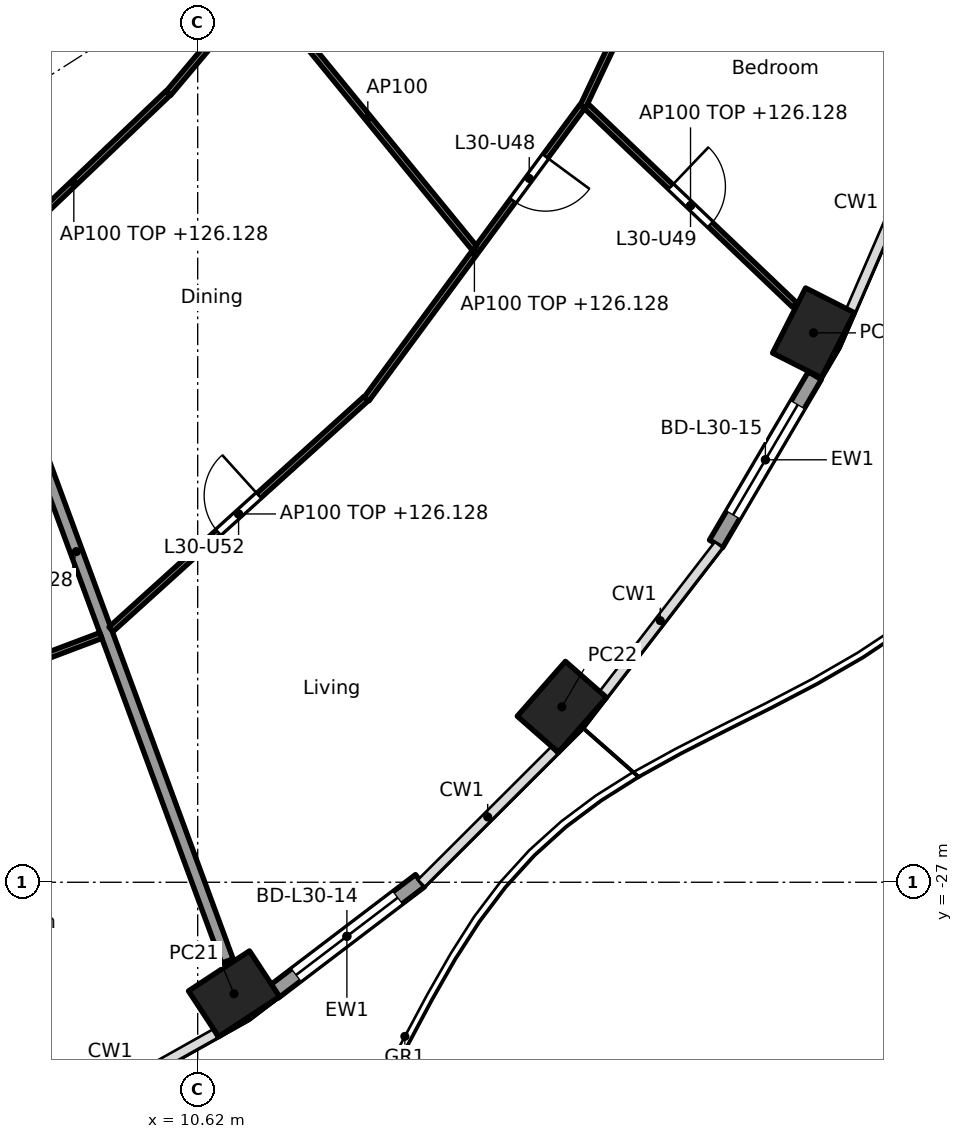
"""IFC4 building model, lengths in metres.
Left out: names, types, materials, properties, quantities, classifications, styles, units other than length and angle.
Written with IfcOpenShell. Run it as: python <this file> out.ifc"""

import sys

from ifc_helpers import new_model, si_unit, direction, frame, frame_2d, origin, origin_2d, place, context, subcontext, project, spatial, rectangle, hollow_rectangle, extrude, element, fill, save


model = new_model("IFC4")
c1 = context("Model", 3, precision=1e-05, world=origin(), true_north=direction((0.0, 1.0)))
c2 = subcontext(c1, "Body", "Model", "MODEL_VIEW")
j1 = project(units=[si_unit("LENGTHUNIT", "METRE"), si_unit("PLANEANGLEUNIT", "RADIAN")], contexts=[c1])
p1 = place(None, origin())
s1 = spatial("IfcSite", under=j1, at=p1, CompositionType="ELEMENT")
p2 = place(p1, origin())
s2 = spatial("IfcBuilding", under=s1, at=p2, CompositionType="ELEMENT")
p3 = place(p2, frame((0.0, 0.0, 123.3)))
s3 = spatial("IfcBuildingStorey", under=s2, at=p3, CompositionType="ELEMENT", Elevation=123.3)
for number, where, z_axis, x_axis in (
    (1, (11.218, -28.834, 0.0), (0.0, 0.0, 1.0), (0.836, 0.549, 0.0)),
    (2, (16.61, -24.115, 0.0), (0.0, 0.0, 1.0), (0.66, 0.751, 0.0)),
    (3, (20.747, -17.965, 0.0), (0.0, 0.0, 1.0), (0.452, 0.892, 0.0)),
):
    element("IfcColumn", number, at=place(p3, frame(where, z_axis=z_axis, x_axis=x_axis)), inside=s3, PredefinedType="COLUMN", context=c2, shape_type="SweptSolid", body=[
        extrude(hollow_rectangle(XDim=1.2, YDim=0.9, WallThickness=0.04, at=origin_2d()), origin(), (0.0, 0.0, 1.0), 3.7),
    ])
p4 = place(p3, frame((14.278, -26.973, 0.0), z_axis=(0.0, 0.0, 1.0), x_axis=(-0.796022231079, -0.605267385233, 0.0)))
e4 = element("IfcWall", 4, at=p4, inside=s3, PredefinedType="SOLIDWALL", context=c2, shape_type="SweptSolid", body=[
    extrude(rectangle(XDim=3.026, YDim=0.25, at=frame_2d((1.513, 0.0))), origin(), (0.0, 0.0, 1.0), 3.44),
])
p5 = place(p4, frame((0.463, 0.0, 0.0)))
e5 = element("IfcOpeningElement", 5, at=p5, cuts=e4, PredefinedType="OPENING", context=c2, shape_type="SweptSolid", body=[
    extrude(rectangle(XDim=2.1, YDim=2.4, at=frame_2d((1.05, 1.2))), frame((0.0, 0.135, 0.0), z_axis=(0.0, -1.0, 0.0), x_axis=(1.0, 0.0, 0.0)), (0.0, 0.0, 1.0), 0.27),
])
p6 = place(p3, frame((20.768, -18.669, 0.0), z_axis=(0.0, 0.0, 1.0), x_axis=(-0.506314982873, -0.862348617508, 0.0)))
e6 = element("IfcWall", 6, at=p6, inside=s3, PredefinedType="SOLIDWALL", context=c2, shape_type="SweptSolid", body=[
    extrude(rectangle(XDim=3.208, YDim=0.25, at=frame_2d((1.604, 0.0))), origin(), (0.0, 0.0, 1.0), 3.44),
])
p7 = place(p6, frame((0.554, 0.0, 0.0)))
e7 = element("IfcOpeningElement", 7, at=p7, cuts=e6, PredefinedType="OPENING", context=c2, shape_type="SweptSolid", body=[
    extrude(rectangle(XDim=2.1, YDim=2.4, at=frame_2d((1.05, 1.2))), frame((0.0, 0.135, 0.0), z_axis=(0.0, -1.0, 0.0), x_axis=(1.0, 0.0, 0.0)), (0.0, 0.0, 1.0), 0.27),
])
p8 = place(p3, frame((6.14, -14.829, 0.0), z_axis=(0.0, 0.0, 1.0), x_axis=(0.346169582481, -0.938171956608, 0.0)))
e8 = element("IfcWall", 8, at=p8, inside=s3, PredefinedType="PARTITIONING", context=c2, shape_type="SweptSolid", body=[
    extrude(rectangle(XDim=14.354, YDim=0.2, at=frame_2d((7.177, 0.0))), origin(), (0.0, 0.0, 1.0), 2.828),
])
p9 = place(p3, frame((4.178, -24.773, 0.0), z_axis=(0.0, 0.0, 1.0), x_axis=(0.935583811437, 0.353104703702, 0.0)))
e9 = element("IfcWall", 9, at=p9, inside=s3, PredefinedType="PARTITIONING", context=c2, shape_type="SweptSolid", body=[
    extrude(rectangle(XDim=5.184, YDim=0.1, at=frame_2d((2.592, 0.0))), origin(), (0.0, 0.0, 1.0), 2.828),
])
p10 = place(p3, frame((7.032, -16.98, 0.0), z_axis=(0.0, 0.0, 1.0), x_axis=(0.723709759148, 0.690104473622, 0.0)))
e10 = element("IfcWall", 10, at=p10, inside=s3, PredefinedType="PARTITIONING", context=c2, shape_type="SweptSolid", body=[
    extrude(rectangle(XDim=4.286, YDim=0.1, at=frame_2d((2.143, 0.0))), origin(), (0.0, 0.0, 1.0), 2.828),
])
p11 = place(p3, frame((9.195, -22.84, 0.0), z_axis=(0.0, 0.0, 1.0), x_axis=(0.741675855479, 0.670758470241, 0.0)))
e11 = element("IfcWall", 11, at=p11, inside=s3, PredefinedType="PARTITIONING", context=c2, shape_type="SweptSolid", body=[
    extrude(rectangle(XDim=5.656, YDim=0.1, at=frame_2d((2.828, 0.0))), origin(), (0.0, 0.0, 1.0), 2.828),
])
p12 = place(p11, frame((2.378, 0.0, 0.0)))
e12 = element("IfcOpeningElement", 12, at=p12, cuts=e11, PredefinedType="OPENING", context=c2, shape_type="SweptSolid", body=[
    extrude(rectangle(XDim=0.9, YDim=2.1, at=frame_2d((0.45, 1.05))), frame((0.0, 0.06, 0.0), z_axis=(0.0, -1.0, 0.0), x_axis=(1.0, 0.0, 0.0)), (0.0, 0.0, 1.0), 0.12),
])
p13 = place(p3, frame((10.138, -14.026, 0.0), z_axis=(0.0, 0.0, 1.0), x_axis=(0.644051444483, 0.764982180746, 0.0)))
e13 = element("IfcWall", 13, at=p13, inside=s3, PredefinedType="PARTITIONING", context=c2, shape_type="SweptSolid", body=[
    extrude(rectangle(XDim=4.548, YDim=0.1, at=frame_2d((2.274, 0.0))), origin(), (0.0, 0.0, 1.0), 2.828),
])
p14 = place(p13, frame((2.986, 0.0, 0.0)))
e14 = element("IfcOpeningElement", 14, at=p14, cuts=e13, PredefinedType="OPENING", context=c2, shape_type="SweptSolid", body=[
    extrude(rectangle(XDim=0.9, YDim=2.1, at=frame_2d((0.45, 1.05))), frame((0.0, 0.06, 0.0), z_axis=(0.0, -1.0, 0.0), x_axis=(1.0, 0.0, 0.0)), (0.0, 0.0, 1.0), 0.12),
])
p15 = place(p3, frame((13.397, -19.053, 0.0), z_axis=(0.0, 0.0, 1.0), x_axis=(0.593522299069, 0.804817544856, 0.0)))
e15 = element("IfcWall", 15, at=p15, inside=s3, PredefinedType="PARTITIONING", context=c2, shape_type="SweptSolid", body=[
    extrude(rectangle(XDim=5.976, YDim=0.1, at=frame_2d((2.988, 0.0))), origin(), (0.0, 0.0, 1.0), 2.828),
])
p16 = place(p15, frame((4.057, 0.0, 0.0)))
e16 = element("IfcOpeningElement", 16, at=p16, cuts=e15, PredefinedType="OPENING", context=c2, shape_type="SweptSolid", body=[
    extrude(rectangle(XDim=0.9, YDim=2.1, at=frame_2d((0.45, 1.05))), frame((0.0, 0.06, 0.0), z_axis=(0.0, -1.0, 0.0), x_axis=(1.0, 0.0, 0.0)), (0.0, 0.0, 1.0), 0.12),
])
p17 = place(p3, frame((11.667, -12.287, 0.0), z_axis=(0.0, 0.0, 1.0), x_axis=(0.633038312428, -0.774120465431, 0.0)))
e17 = element("IfcWall", 17, at=p17, inside=s3, PredefinedType="PARTITIONING", context=c2, shape_type="SweptSolid", body=[
    extrude(rectangle(XDim=5.532, YDim=0.1, at=frame_2d((2.766, 0.0))), origin(), (0.0, 0.0, 1.0), 3.44),
])
p18 = place(p3, frame((17.01, -14.238, 0.0), z_axis=(0.0, 0.0, 1.0), x_axis=(0.723650186498, -0.690166941821, 0.0)))
e18 = element("IfcWall", 18, at=p18, inside=s3, PredefinedType="PARTITIONING", context=c2, shape_type="SweptSolid", body=[
    extrude(rectangle(XDim=4.74, YDim=0.1, at=frame_2d((2.37, 0.0))), origin(), (0.0, 0.0, 1.0), 2.828),
])
p19 = place(p18, frame((1.92, 0.0, 0.0)))
e19 = element("IfcOpeningElement", 19, at=p19, cuts=e18, PredefinedType="OPENING", context=c2, shape_type="SweptSolid", body=[
    extrude(rectangle(XDim=0.9, YDim=2.1, at=frame_2d((0.45, 1.05))), frame((0.0, 0.06, 0.0), z_axis=(0.0, -1.0, 0.0), x_axis=(1.0, 0.0, 0.0)), (0.0, 0.0, 1.0), 0.12),
])
p20 = place(p3, frame((16.953, -14.249, 0.0), z_axis=(0.0, 0.0, 1.0), x_axis=(0.427456178439, 0.904036069808, 0.0)))
e20 = element("IfcWall", 20, at=p20, inside=s3, PredefinedType="PARTITIONING", context=c2, shape_type="SweptSolid", body=[
    extrude(rectangle(XDim=6.113, YDim=0.1, at=frame_2d((3.057, 0.0))), origin(), (0.0, 0.0, 1.0), 2.828),
])
p21 = place(p5, origin())
e21 = element("IfcDoor", 21, at=p21, inside=s3, OperationType="SLIDING_TO_LEFT", PredefinedType="DOOR", context=c2, shape_type="SweptSolid", body=[
    extrude(rectangle(XDim=2.1, YDim=2.4, at=frame_2d((1.05, 1.2))), frame((0.0, 0.025, 0.0), z_axis=(0.0, -1.0, 0.0), x_axis=(1.0, 0.0, 0.0)), (0.0, 0.0, 1.0), 0.05),
])
fill(e5, e21)
p22 = place(p7, origin())
e22 = element("IfcDoor", 22, at=p22, inside=s3, OperationType="SLIDING_TO_LEFT", PredefinedType="DOOR", context=c2, shape_type="SweptSolid", body=[
    extrude(rectangle(XDim=2.1, YDim=2.4, at=frame_2d((1.05, 1.2))), frame((0.0, 0.025, 0.0), z_axis=(0.0, -1.0, 0.0), x_axis=(1.0, 0.0, 0.0)), (0.0, 0.0, 1.0), 0.05),
])
fill(e7, e22)
p23 = place(p16, frame((0.9, 0.0, 0.0), x_axis=(-1.0, 0.0, 0.0)))
e23 = element("IfcDoor", 23, at=p23, inside=s3, OperationType="SINGLE_SWING_LEFT", PredefinedType="DOOR", context=c2, shape_type="SweptSolid", body=[
    extrude(rectangle(XDim=0.9, YDim=2.1, at=frame_2d((0.45, 1.05))), frame((0.0, 0.025, 0.0), z_axis=(0.0, -1.0, 0.0), x_axis=(1.0, 0.0, 0.0)), (0.0, 0.0, 1.0), 0.05),
])
fill(e16, e23)
p24 = place(p19, origin())
e24 = element("IfcDoor", 24, at=p24, inside=s3, OperationType="SINGLE_SWING_LEFT", PredefinedType="DOOR", context=c2, shape_type="SweptSolid", body=[
    extrude(rectangle(XDim=0.9, YDim=2.1, at=frame_2d((0.45, 1.05))), frame((0.0, 0.025, 0.0), z_axis=(0.0, -1.0, 0.0), x_axis=(1.0, 0.0, 0.0)), (0.0, 0.0, 1.0), 0.05),
])
fill(e19, e24)
p25 = place(p12, origin())
e25 = element("IfcDoor", 25, at=p25, inside=s3, OperationType="SINGLE_SWING_RIGHT", PredefinedType="DOOR", context=c2, shape_type="SweptSolid", body=[
    extrude(rectangle(XDim=0.9, YDim=2.1, at=frame_2d((0.45, 1.05))), frame((0.0, 0.025, 0.0), z_axis=(0.0, -1.0, 0.0), x_axis=(1.0, 0.0, 0.0)), (0.0, 0.0, 1.0), 0.05),
])
fill(e12, e25)
save(model, sys.argv[1])
